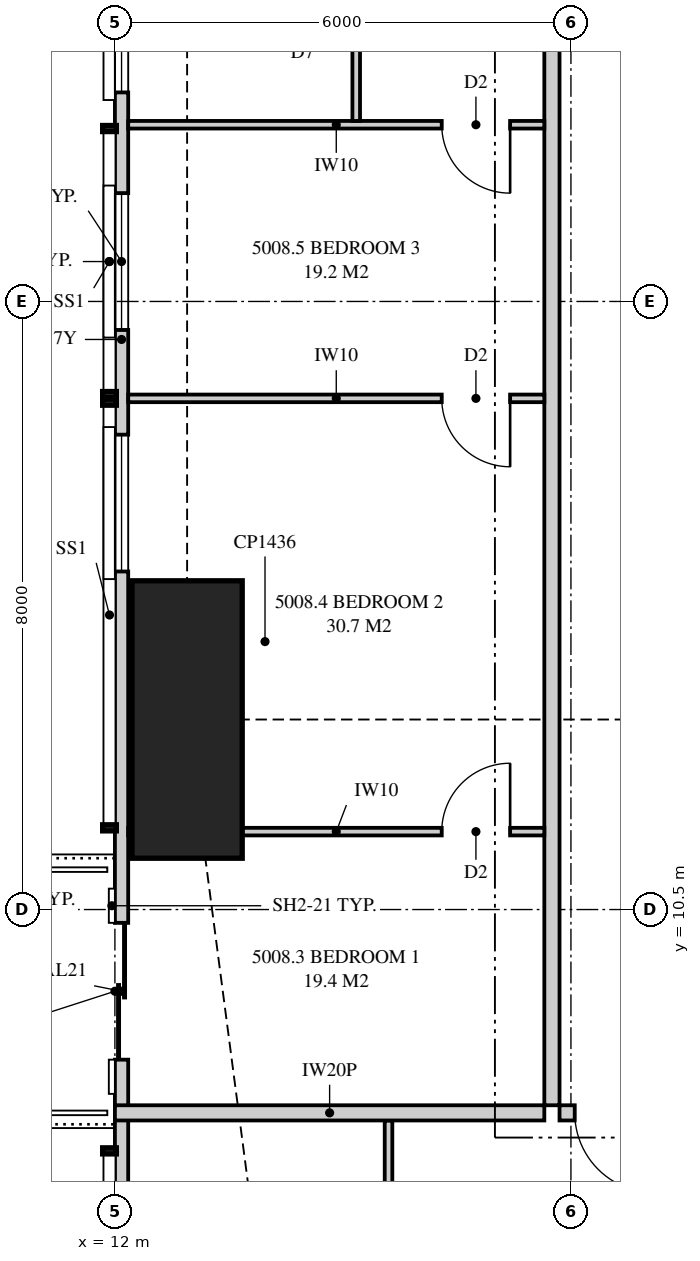
"""IFC4 building model, lengths in metres.
Left out: names, types, materials, properties, quantities, classifications, styles, units other than length and angle.
Written with IfcOpenShell. Run it as: python <this file> out.ifc"""

import sys

from ifc_helpers import new_model, si_unit, direction, frame, frame_2d, origin, origin_2d, place, context, subcontext, project, spatial, polyline, rectangle, outline, extrude, element, fill, save


model = new_model("IFC4")
c1 = context("Model", 3, precision=1e-05, world=origin(), true_north=direction((0.0, 1.0)))
c2 = subcontext(c1, "Body", "Model", "MODEL_VIEW")
j1 = project(units=[si_unit("LENGTHUNIT", "METRE"), si_unit("PLANEANGLEUNIT", "RADIAN")], contexts=[c1])
p1 = place(None, origin())
s1 = spatial("IfcSite", under=j1, at=p1, CompositionType="ELEMENT")
p2 = place(p1, origin())
s2 = spatial("IfcBuilding", under=s1, at=p2, CompositionType="ELEMENT")
p3 = place(p2, frame((0.0, 0.0, 184.5)))
s3 = spatial("IfcBuildingStorey", under=s2, at=p3, CompositionType="ELEMENT", Elevation=184.5)
p4 = place(p3, frame((12.95, 13.0, 0.0), z_axis=(0.0, 0.0, 1.0), x_axis=(1.0, 0.0, 0.0)))
e1 = element("IfcColumn", 1, at=p4, inside=s3, PredefinedType="COLUMN", context=c2, shape_type="SweptSolid", body=[
    extrude(rectangle(XDim=1.45, YDim=3.65, at=origin_2d()), origin(), (0.0, 0.0, 1.0), 3.35),
])
p5 = place(p3, frame((12.087, 32.949, 0.0), z_axis=(0.0, 0.0, 1.0), x_axis=(0.0, -1.0, 0.0)))
e2 = element("IfcWall", 2, at=p5, inside=s3, PredefinedType="SOLIDWALL", context=c2, shape_type="SweptSolid", body=[
    extrude(outline(polyline([(0.0, 0.0), (29.897, 0.0), (29.897, 3.11), (20.191, 3.11), (20.191, 2.15), (20.051, 2.15), (20.051, 3.11), (19.949, 3.11), (19.949, 2.15), (7.949, 2.15), (7.949, 3.11), (7.823, 3.11), (7.823, 2.15), (7.73, 2.15), (7.73, 3.11), (0.0, 3.11), (0.0, 0.0)])), frame((0.0, 0.087, 0.0), z_axis=(0.0, -1.0, 0.0), x_axis=(1.0, 0.0, 0.0)), (0.0, 0.0, 1.0), 0.175),
])
p6 = place(p5, frame((1.599, 0.0, 0.4)))
e3 = element("IfcOpeningElement", 3, at=p6, cuts=e2, PredefinedType="OPENING", context=c2, shape_type="SweptSolid", body=[
    extrude(rectangle(XDim=1.2, YDim=1.7, at=frame_2d((0.6, 0.85))), frame((0.0, 0.097, 0.0), z_axis=(0.0, -1.0, 0.0), x_axis=(1.0, 0.0, 0.0)), (0.0, 0.0, 1.0), 0.195),
])
p7 = place(p5, frame((9.899, 0.0, 0.4)))
e4 = element("IfcOpeningElement", 4, at=p7, cuts=e2, PredefinedType="OPENING", context=c2, shape_type="SweptSolid", body=[
    extrude(rectangle(XDim=1.8, YDim=1.7, at=frame_2d((0.9, 0.85))), frame((0.0, 0.097, 0.0), z_axis=(0.0, -1.0, 0.0), x_axis=(1.0, 0.0, 0.0)), (0.0, 0.0, 1.0), 0.195),
])
p8 = place(p5, frame((13.024, 0.0, 0.4)))
e5 = element("IfcOpeningElement", 5, at=p8, cuts=e2, PredefinedType="OPENING", context=c2, shape_type="SweptSolid", body=[
    extrude(rectangle(XDim=1.8, YDim=1.7, at=frame_2d((0.9, 0.85))), frame((0.0, 0.097, 0.0), z_axis=(0.0, -1.0, 0.0), x_axis=(1.0, 0.0, 0.0)), (0.0, 0.0, 1.0), 0.195),
])
p9 = place(p5, frame((16.201, 0.0, 0.4)))
e6 = element("IfcOpeningElement", 6, at=p9, cuts=e2, PredefinedType="OPENING", context=c2, shape_type="SweptSolid", body=[
    extrude(rectangle(XDim=1.8, YDim=1.7, at=frame_2d((0.9, 0.85))), frame((0.0, 0.097, 0.0), z_axis=(0.0, -1.0, 0.0), x_axis=(1.0, 0.0, 0.0)), (0.0, 0.0, 1.0), 0.195),
])
p10 = place(p5, frame((22.624, 0.0, 0.0)))
e7 = element("IfcOpeningElement", 7, at=p10, cuts=e2, PredefinedType="OPENING", context=c2, shape_type="SweptSolid", body=[
    extrude(rectangle(XDim=1.8, YDim=2.1, at=frame_2d((0.9, 1.05))), frame((0.0, 0.097, 0.0), z_axis=(0.0, -1.0, 0.0), x_axis=(1.0, 0.0, 0.0)), (0.0, 0.0, 1.0), 0.195),
])
p11 = place(p3, frame((17.85, 7.825, 0.0), z_axis=(0.0, 0.0, 1.0), x_axis=(1.0, 0.0, 0.0)))
e8 = element("IfcWall", 8, at=p11, inside=s3, PredefinedType="PARTITIONING", context=c2, shape_type="SweptSolid", body=[
    extrude(outline(polyline([(0.0, 0.0), (5.35, 0.0), (5.35, 3.11), (4.737, 3.11), (4.737, 2.541), (4.062, 2.541), (4.062, 3.11), (0.0, 3.11), (0.0, 0.0)])), frame((0.0, 0.1, 0.0), z_axis=(0.0, -1.0, 0.0), x_axis=(1.0, 0.0, 0.0)), (0.0, 0.0, 1.0), 0.2),
])
p12 = place(p11, frame((0.2, 0.0, 0.0)))
e9 = element("IfcOpeningElement", 9, at=p12, cuts=e8, PredefinedType="OPENING", context=c2, shape_type="SweptSolid", body=[
    extrude(rectangle(XDim=1.05, YDim=2.2, at=frame_2d((0.525, 1.1))), frame((0.0, 0.11, 0.0), z_axis=(0.0, -1.0, 0.0), x_axis=(1.0, 0.0, 0.0)), (0.0, 0.0, 1.0), 0.22),
])
p13 = place(p3, frame((15.6, 0.175, 0.0), z_axis=(0.0, 0.0, 1.0), x_axis=(0.0, 1.0, 0.0)))
e10 = element("IfcWall", 10, at=p13, inside=s3, PredefinedType="PARTITIONING", context=c2, shape_type="SweptSolid", body=[
    extrude(outline(polyline([(0.0, 0.0), (7.55, 0.0), (7.55, 3.11), (2.825, 3.11), (2.825, 2.15), (1.079, 2.15), (1.079, 3.11), (0.0, 3.11), (0.0, 0.0)])), frame((0.0, 0.05, 0.0), z_axis=(0.0, -1.0, 0.0), x_axis=(1.0, 0.0, 0.0)), (0.0, 0.0, 1.0), 0.1),
])
p14 = place(p13, frame((3.7, 0.0, 0.0)))
e11 = element("IfcOpeningElement", 11, at=p14, cuts=e10, PredefinedType="OPENING", context=c2, shape_type="SweptSolid", body=[
    extrude(rectangle(XDim=0.9, YDim=2.1, at=frame_2d((0.45, 1.05))), frame((0.0, 0.06, 0.0), z_axis=(0.0, -1.0, 0.0), x_axis=(1.0, 0.0, 0.0)), (0.0, 0.0, 1.0), 0.12),
])
p15 = place(p3, frame((12.0, 7.825, 0.0), z_axis=(0.0, 0.0, 1.0), x_axis=(1.0, 0.0, 0.0)))
e12 = element("IfcWall", 12, at=p15, inside=s3, PredefinedType="PARTITIONING", context=c2, shape_type="SweptSolid", body=[
    extrude(outline(polyline([(0.0, 0.0), (5.65, 0.0), (5.65, 3.11), (2.547, 3.11), (2.547, 2.15), (0.712, 2.15), (0.712, 3.11), (0.0, 3.11), (0.0, 0.0)])), frame((0.0, 0.1, 0.0), z_axis=(0.0, -1.0, 0.0), x_axis=(1.0, 0.0, 0.0)), (0.0, 0.0, 1.0), 0.2),
])
p16 = place(p3, frame((17.75, 7.925, 0.0), z_axis=(0.0, 0.0, 1.0), x_axis=(0.0, 1.0, 0.0)))
e13 = element("IfcWall", 13, at=p16, inside=s3, PredefinedType="PARTITIONING", context=c2, shape_type="SweptSolid", body=[
    extrude(outline(polyline([(0.0, 0.0), (21.15, 0.0), (21.15, 3.11), (17.412, 3.11), (17.412, 2.541), (16.738, 2.541), (16.738, 3.11), (5.412, 3.11), (5.412, 2.541), (4.738, 2.541), (4.738, 3.11), (0.0, 3.11), (0.0, 0.0)])), frame((0.0, 0.1, 0.0), z_axis=(0.0, -1.0, 0.0), x_axis=(1.0, 0.0, 0.0)), (0.0, 0.0, 1.0), 0.2),
])
p17 = place(p16, frame((16.25, 0.0, 0.0)))
e14 = element("IfcOpeningElement", 14, at=p17, cuts=e13, PredefinedType="OPENING", context=c2, shape_type="SweptSolid", body=[
    extrude(rectangle(XDim=1.05, YDim=2.2, at=frame_2d((0.525, 1.1))), frame((0.0, 0.11, 0.0), z_axis=(0.0, -1.0, 0.0), x_axis=(1.0, 0.0, 0.0)), (0.0, 0.0, 1.0), 0.22),
])
p18 = place(p3, frame((12.175, 11.525, 0.0), z_axis=(0.0, 0.0, 1.0), x_axis=(1.0, 0.0, 0.0)))
e15 = element("IfcWall", 15, at=p18, inside=s3, PredefinedType="PARTITIONING", context=c2, shape_type="SweptSolid", body=[
    extrude(outline(polyline([(0.0, 0.0), (5.475, 0.0), (5.475, 3.11), (1.836, 3.11), (1.836, 2.15), (0.101, 2.15), (0.101, 3.11), (0.0, 3.11), (0.0, 0.0)])), frame((0.0, 0.05, 0.0), z_axis=(0.0, -1.0, 0.0), x_axis=(1.0, 0.0, 0.0)), (0.0, 0.0, 1.0), 0.1),
])
p19 = place(p18, frame((4.125, 0.0, 0.0)))
e16 = element("IfcOpeningElement", 16, at=p19, cuts=e15, PredefinedType="OPENING", context=c2, shape_type="SweptSolid", body=[
    extrude(rectangle(XDim=0.9, YDim=2.1, at=frame_2d((0.45, 1.05))), frame((0.0, 0.06, 0.0), z_axis=(0.0, -1.0, 0.0), x_axis=(1.0, 0.0, 0.0)), (0.0, 0.0, 1.0), 0.12),
])
p20 = place(p3, frame((12.175, 17.225, 0.0), z_axis=(0.0, 0.0, 1.0), x_axis=(1.0, 0.0, 0.0)))
e17 = element("IfcWall", 17, at=p20, inside=s3, PredefinedType="PARTITIONING", context=c2, shape_type="SweptSolid", body=[
    extrude(outline(polyline([(0.0, 0.0), (5.475, 0.0), (5.475, 3.11), (1.635, 3.11), (1.635, 2.15), (0.0, 2.15), (0.0, 3.11), (0.0, 0.0)])), frame((0.0, 0.05, 0.0), z_axis=(0.0, -1.0, 0.0), x_axis=(1.0, 0.0, 0.0)), (0.0, 0.0, 1.0), 0.1),
])
p21 = place(p20, frame((4.125, 0.0, 0.0)))
e18 = element("IfcOpeningElement", 18, at=p21, cuts=e17, PredefinedType="OPENING", context=c2, shape_type="SweptSolid", body=[
    extrude(rectangle(XDim=0.9, YDim=2.1, at=frame_2d((0.45, 1.05))), frame((0.0, 0.06, 0.0), z_axis=(0.0, -1.0, 0.0), x_axis=(1.0, 0.0, 0.0)), (0.0, 0.0, 1.0), 0.12),
])
p22 = place(p3, frame((12.175, 20.825, 0.0), z_axis=(0.0, 0.0, 1.0), x_axis=(1.0, 0.0, 0.0)))
e19 = element("IfcWall", 19, at=p22, inside=s3, PredefinedType="PARTITIONING", context=c2, shape_type="SweptSolid", body=[
    extrude(outline(polyline([(0.0, 0.0), (5.475, 0.0), (5.475, 3.11), (1.635, 3.11), (1.635, 2.15), (0.0, 2.15), (0.0, 3.11), (0.0, 0.0)])), frame((0.0, 0.05, 0.0), z_axis=(0.0, -1.0, 0.0), x_axis=(1.0, 0.0, 0.0)), (0.0, 0.0, 1.0), 0.1),
])
p23 = place(p22, frame((4.125, 0.0, 0.0)))
e20 = element("IfcOpeningElement", 20, at=p23, cuts=e19, PredefinedType="OPENING", context=c2, shape_type="SweptSolid", body=[
    extrude(rectangle(XDim=0.9, YDim=2.1, at=frame_2d((0.45, 1.05))), frame((0.0, 0.06, 0.0), z_axis=(0.0, -1.0, 0.0), x_axis=(1.0, 0.0, 0.0)), (0.0, 0.0, 1.0), 0.12),
])
p24 = place(p3, frame((15.175, 20.875, 0.0), z_axis=(0.0, 0.0, 1.0), x_axis=(0.0, 1.0, 0.0)))
e21 = element("IfcWall", 21, at=p24, inside=s3, PredefinedType="PARTITIONING", context=c2, shape_type="SweptSolid", body=[
    extrude(rectangle(XDim=3.2, YDim=0.1, at=frame_2d((1.6, 0.0))), origin(), (0.0, 0.0, 1.0), 3.11),
])
p25 = place(p24, frame((1.15, 0.0, 0.0)))
e22 = element("IfcOpeningElement", 22, at=p25, cuts=e21, PredefinedType="OPENING", context=c2, shape_type="SweptSolid", body=[
    extrude(rectangle(XDim=0.9, YDim=2.1, at=frame_2d((0.45, 1.05))), frame((0.0, 0.06, 0.0), z_axis=(0.0, -1.0, 0.0), x_axis=(1.0, 0.0, 0.0)), (0.0, 0.0, 1.0), 0.12),
])
p26 = place(p7, origin())
e23 = element("IfcWindow", 23, at=p26, inside=s3, PartitioningType="SINGLE_PANEL", PredefinedType="WINDOW", context=c2, shape_type="SweptSolid", body=[
    extrude(rectangle(XDim=1.8, YDim=1.7, at=frame_2d((0.9, 0.85))), frame((0.0, 0.03, 0.0), z_axis=(0.0, -1.0, 0.0), x_axis=(1.0, 0.0, 0.0)), (0.0, 0.0, 1.0), 0.06),
])
fill(e4, e23)
p27 = place(p8, origin())
e24 = element("IfcWindow", 24, at=p27, inside=s3, PartitioningType="SINGLE_PANEL", PredefinedType="WINDOW", context=c2, shape_type="SweptSolid", body=[
    extrude(rectangle(XDim=1.8, YDim=1.7, at=frame_2d((0.9, 0.85))), frame((0.0, 0.03, 0.0), z_axis=(0.0, -1.0, 0.0), x_axis=(1.0, 0.0, 0.0)), (0.0, 0.0, 1.0), 0.06),
])
fill(e5, e24)
p28 = place(p9, origin())
e25 = element("IfcWindow", 25, at=p28, inside=s3, PartitioningType="SINGLE_PANEL", PredefinedType="WINDOW", context=c2, shape_type="SweptSolid", body=[
    extrude(rectangle(XDim=1.8, YDim=1.7, at=frame_2d((0.9, 0.85))), frame((0.0, 0.03, 0.0), z_axis=(0.0, -1.0, 0.0), x_axis=(1.0, 0.0, 0.0)), (0.0, 0.0, 1.0), 0.06),
])
fill(e6, e25)
p29 = place(p10, origin())
e26 = element("IfcDoor", 26, at=p29, inside=s3, OperationType="SLIDING_TO_LEFT", PredefinedType="DOOR", context=c2, shape_type="SweptSolid", body=[
    extrude(rectangle(XDim=1.8, YDim=2.1, at=frame_2d((0.9, 1.05))), frame((0.0, 0.025, 0.0), z_axis=(0.0, -1.0, 0.0), x_axis=(1.0, 0.0, 0.0)), (0.0, 0.0, 1.0), 0.05),
])
fill(e7, e26)
p30 = place(p12, frame((1.05, 0.0, 0.0), z_axis=(0.0, 0.0, 1.0), x_axis=(-1.0, 0.0, 0.0)))
e27 = element("IfcDoor", 27, at=p30, inside=s3, OperationType="SINGLE_SWING_LEFT", PredefinedType="DOOR", context=c2, shape_type="SweptSolid", body=[
    extrude(rectangle(XDim=1.05, YDim=2.2, at=frame_2d((0.525, 1.1))), frame((0.0, 0.025, 0.0), z_axis=(0.0, -1.0, 0.0), x_axis=(1.0, 0.0, 0.0)), (0.0, 0.0, 1.0), 0.05),
])
fill(e9, e27)
p31 = place(p19, origin())
e28 = element("IfcDoor", 28, at=p31, inside=s3, OperationType="SINGLE_SWING_RIGHT", PredefinedType="DOOR", context=c2, shape_type="SweptSolid", body=[
    extrude(rectangle(XDim=0.9, YDim=2.1, at=frame_2d((0.45, 1.05))), frame((0.0, 0.025, 0.0), z_axis=(0.0, -1.0, 0.0), x_axis=(1.0, 0.0, 0.0)), (0.0, 0.0, 1.0), 0.05),
])
fill(e16, e28)
p32 = place(p21, frame((0.9, 0.0, 0.0), z_axis=(0.0, 0.0, 1.0), x_axis=(-1.0, 0.0, 0.0)))
e29 = element("IfcDoor", 29, at=p32, inside=s3, OperationType="SINGLE_SWING_LEFT", PredefinedType="DOOR", context=c2, shape_type="SweptSolid", body=[
    extrude(rectangle(XDim=0.9, YDim=2.1, at=frame_2d((0.45, 1.05))), frame((0.0, 0.025, 0.0), z_axis=(0.0, -1.0, 0.0), x_axis=(1.0, 0.0, 0.0)), (0.0, 0.0, 1.0), 0.05),
])
fill(e18, e29)
p33 = place(p23, frame((0.9, 0.0, 0.0), z_axis=(0.0, 0.0, 1.0), x_axis=(-1.0, 0.0, 0.0)))
e30 = element("IfcDoor", 30, at=p33, inside=s3, OperationType="SINGLE_SWING_LEFT", PredefinedType="DOOR", context=c2, shape_type="SweptSolid", body=[
    extrude(rectangle(XDim=0.9, YDim=2.1, at=frame_2d((0.45, 1.05))), frame((0.0, 0.025, 0.0), z_axis=(0.0, -1.0, 0.0), x_axis=(1.0, 0.0, 0.0)), (0.0, 0.0, 1.0), 0.05),
])
fill(e20, e30)
save(model, sys.argv[1])
